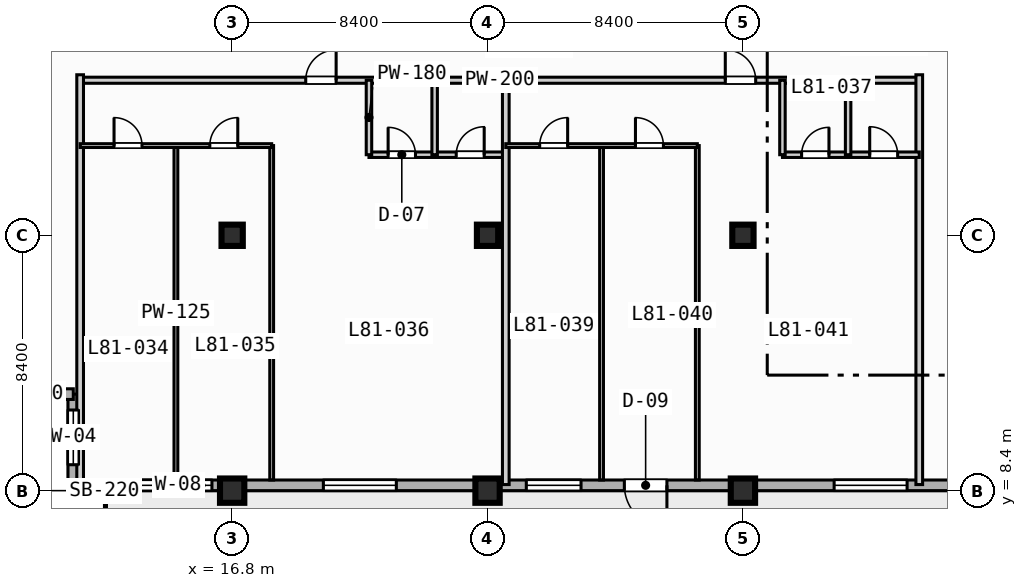
"""IFC4 building model, lengths in metres.
Left out: names, types, materials, properties, quantities, classifications, styles, units other than length and angle.
Written with IfcOpenShell. Run it as: python <this file> out.ifc"""

import sys

from ifc_helpers import new_model, si_unit, direction, frame, frame_2d, origin, origin_2d, place, context, subcontext, project, spatial, rectangle, extrude, element, fill, save


model = new_model("IFC4")
c1 = context("Model", 3, precision=1e-05, world=origin(), true_north=direction((0.0, 1.0)))
c2 = subcontext(c1, "Body", "Model", "MODEL_VIEW")
j1 = project(units=[si_unit("LENGTHUNIT", "METRE"), si_unit("PLANEANGLEUNIT", "RADIAN")], contexts=[c1])
p1 = place(None, origin())
s1 = spatial("IfcSite", under=j1, at=p1, CompositionType="ELEMENT")
p2 = place(p1, origin())
s2 = spatial("IfcBuilding", under=s1, at=p2, CompositionType="ELEMENT")
p3 = place(p2, frame((0.0, 0.0, 328.1)))
s3 = spatial("IfcBuildingStorey", under=s2, at=p3, CompositionType="ELEMENT", Elevation=328.1)
p4 = place(p3, frame((16.8, 8.4, 0.0), z_axis=(0.0, 0.0, 1.0), x_axis=(1.0, 0.0, 0.0)))
e1 = element("IfcColumn", 1, at=p4, inside=s3, PredefinedType="COLUMN", context=c2, shape_type="SweptSolid", body=[
    extrude(rectangle(XDim=0.8, YDim=0.8, at=origin_2d()), origin(), (0.0, 0.0, 1.0), 3.9),
])
p5 = place(p3, frame((16.8, 16.8, 0.0), z_axis=(0.0, 0.0, 1.0), x_axis=(1.0, 0.0, 0.0)))
e2 = element("IfcColumn", 2, at=p5, inside=s3, PredefinedType="COLUMN", context=c2, shape_type="SweptSolid", body=[
    extrude(rectangle(XDim=0.7, YDim=0.7, at=origin_2d()), origin(), (0.0, 0.0, 1.0), 3.9),
])
p6 = place(p3, frame((25.2, 8.4, 0.0), z_axis=(0.0, 0.0, 1.0), x_axis=(1.0, 0.0, 0.0)))
e3 = element("IfcColumn", 3, at=p6, inside=s3, PredefinedType="COLUMN", context=c2, shape_type="SweptSolid", body=[
    extrude(rectangle(XDim=0.8, YDim=0.8, at=origin_2d()), origin(), (0.0, 0.0, 1.0), 3.9),
])
p7 = place(p3, frame((25.2, 16.8, 0.0), z_axis=(0.0, 0.0, 1.0), x_axis=(1.0, 0.0, 0.0)))
e4 = element("IfcColumn", 4, at=p7, inside=s3, PredefinedType="COLUMN", context=c2, shape_type="SweptSolid", body=[
    extrude(rectangle(XDim=0.7, YDim=0.7, at=origin_2d()), origin(), (0.0, 0.0, 1.0), 3.9),
])
p8 = place(p3, frame((33.6, 8.4, 0.0), z_axis=(0.0, 0.0, 1.0), x_axis=(1.0, 0.0, 0.0)))
e5 = element("IfcColumn", 5, at=p8, inside=s3, PredefinedType="COLUMN", context=c2, shape_type="SweptSolid", body=[
    extrude(rectangle(XDim=0.8, YDim=0.8, at=origin_2d()), origin(), (0.0, 0.0, 1.0), 3.9),
])
p9 = place(p3, frame((33.6, 16.8, 0.0), z_axis=(0.0, 0.0, 1.0), x_axis=(1.0, 0.0, 0.0)))
e6 = element("IfcColumn", 6, at=p9, inside=s3, PredefinedType="COLUMN", context=c2, shape_type="SweptSolid", body=[
    extrude(rectangle(XDim=0.7, YDim=0.7, at=origin_2d()), origin(), (0.0, 0.0, 1.0), 3.9),
])
p10 = place(p3, frame((11.575, 8.575, 0.0), z_axis=(0.0, 0.0, 1.0), x_axis=(0.0, 1.0, 0.0)))
e7 = element("IfcWall", 7, at=p10, inside=s3, PredefinedType="STANDARD", context=c2, shape_type="SweptSolid", body=[
    extrude(rectangle(XDim=3.0, YDim=0.35, at=frame_2d((1.5, 0.0))), origin(), (0.0, 0.0, 1.0), 3.67),
])
p11 = place(p10, frame((0.677, 0.0, 0.85)))
e8 = element("IfcOpeningElement", 8, at=p11, cuts=e7, PredefinedType="OPENING", context=c2, shape_type="SweptSolid", body=[
    extrude(rectangle(XDim=1.8, YDim=1.8, at=frame_2d((0.9, 0.9))), frame((0.0, 0.185, 0.0), z_axis=(0.0, -1.0, 0.0), x_axis=(1.0, 0.0, 0.0)), (0.0, 0.0, 1.0), 0.37),
])
p12 = place(p3, frame((11.575, 11.575, 0.0), z_axis=(0.0, 0.0, 1.0), x_axis=(-1.0, 0.0, 0.0)))
e9 = element("IfcWall", 9, at=p12, inside=s3, PredefinedType="STANDARD", context=c2, shape_type="SweptSolid", body=[
    extrude(rectangle(XDim=3.0, YDim=0.35, at=frame_2d((1.5, 0.0))), origin(), (0.0, 0.0, 1.0), 3.67),
])
p13 = place(p3, frame((64.025, 8.575, 0.0), z_axis=(0.0, 0.0, 1.0), x_axis=(-1.0, 0.0, 0.0)))
e10 = element("IfcWall", 10, at=p13, inside=s3, PredefinedType="STANDARD", context=c2, shape_type="SweptSolid", body=[
    extrude(rectangle(XDim=52.45, YDim=0.35, at=frame_2d((26.225, 0.0))), origin(), (0.0, 0.0, 1.0), 3.67),
])
p14 = place(p13, frame((32.925, 0.0, 0.0)))
e11 = element("IfcOpeningElement", 11, at=p14, cuts=e10, PredefinedType="OPENING", context=c2, shape_type="SweptSolid", body=[
    extrude(rectangle(XDim=1.4, YDim=2.2, at=frame_2d((0.7, 1.1))), frame((0.0, 0.185, 0.0), z_axis=(0.0, -1.0, 0.0), x_axis=(1.0, 0.0, 0.0)), (0.0, 0.0, 1.0), 0.37),
])
p15 = place(p13, frame((41.825, 0.0, 0.85)))
e12 = element("IfcOpeningElement", 12, at=p15, cuts=e10, PredefinedType="OPENING", context=c2, shape_type="SweptSolid", body=[
    extrude(rectangle(XDim=2.4, YDim=1.95, at=frame_2d((1.2, 0.975))), frame((0.0, 0.185, 0.0), z_axis=(0.0, -1.0, 0.0), x_axis=(1.0, 0.0, 0.0)), (0.0, 0.0, 1.0), 0.37),
])
p16 = place(p13, frame((25.025, 0.0, 0.85)))
e13 = element("IfcOpeningElement", 13, at=p16, cuts=e10, PredefinedType="OPENING", context=c2, shape_type="SweptSolid", body=[
    extrude(rectangle(XDim=2.4, YDim=1.95, at=frame_2d((1.2, 0.975))), frame((0.0, 0.185, 0.0), z_axis=(0.0, -1.0, 0.0), x_axis=(1.0, 0.0, 0.0)), (0.0, 0.0, 1.0), 0.37),
])
p17 = place(p13, frame((16.925, 0.0, 0.85)))
e14 = element("IfcOpeningElement", 14, at=p17, cuts=e10, PredefinedType="OPENING", context=c2, shape_type="SweptSolid", body=[
    extrude(rectangle(XDim=1.8, YDim=1.8, at=frame_2d((0.9, 0.9))), frame((0.0, 0.185, 0.0), z_axis=(0.0, -1.0, 0.0), x_axis=(1.0, 0.0, 0.0)), (0.0, 0.0, 1.0), 0.37),
])
p18 = place(p13, frame((49.75, 0.0, 0.85)))
e15 = element("IfcOpeningElement", 15, at=p18, cuts=e10, PredefinedType="OPENING", context=c2, shape_type="SweptSolid", body=[
    extrude(rectangle(XDim=1.8, YDim=1.8, at=frame_2d((0.9, 0.9))), frame((0.0, 0.185, 0.0), z_axis=(0.0, -1.0, 0.0), x_axis=(1.0, 0.0, 0.0)), (0.0, 0.0, 1.0), 0.37),
])
p19 = place(p13, frame((47.89, 0.0, 0.85)))
e16 = element("IfcOpeningElement", 16, at=p19, cuts=e10, PredefinedType="OPENING", context=c2, shape_type="SweptSolid", body=[
    extrude(rectangle(XDim=0.72, YDim=1.8, at=frame_2d((0.36, 0.9))), frame((0.0, 0.185, 0.0), z_axis=(0.0, -1.0, 0.0), x_axis=(1.0, 0.0, 0.0)), (0.0, 0.0, 1.0), 0.37),
])
p20 = place(p13, frame((35.75, 0.0, 0.85)))
e17 = element("IfcOpeningElement", 17, at=p20, cuts=e10, PredefinedType="OPENING", context=c2, shape_type="SweptSolid", body=[
    extrude(rectangle(XDim=1.8, YDim=1.8, at=frame_2d((0.9, 0.9))), frame((0.0, 0.185, 0.0), z_axis=(0.0, -1.0, 0.0), x_axis=(1.0, 0.0, 0.0)), (0.0, 0.0, 1.0), 0.37),
])
p21 = place(p3, frame((11.8, 21.9, 0.0), z_axis=(0.0, 0.0, 1.0), x_axis=(1.0, 0.0, 0.0)))
e18 = element("IfcWall", 18, at=p21, inside=s3, PredefinedType="PARTITIONING", context=c2, shape_type="SweptSolid", body=[
    extrude(rectangle(XDim=27.6, YDim=0.2, at=frame_2d((13.8, 0.0))), origin(), (0.0, 0.0, 1.0), 3.67),
])
p22 = place(p21, frame((7.42, 0.0, 0.0)))
e19 = element("IfcOpeningElement", 19, at=p22, cuts=e18, PredefinedType="OPENING", context=c2, shape_type="SweptSolid", body=[
    extrude(rectangle(XDim=1.0, YDim=2.15, at=frame_2d((0.5, 1.075))), frame((0.0, 0.11, 0.0), z_axis=(0.0, -1.0, 0.0), x_axis=(1.0, 0.0, 0.0)), (0.0, 0.0, 1.0), 0.22),
])
p23 = place(p21, frame((21.22, 0.0, 0.0)))
e20 = element("IfcOpeningElement", 20, at=p23, cuts=e18, PredefinedType="OPENING", context=c2, shape_type="SweptSolid", body=[
    extrude(rectangle(XDim=1.0, YDim=2.15, at=frame_2d((0.5, 1.075))), frame((0.0, 0.11, 0.0), z_axis=(0.0, -1.0, 0.0), x_axis=(1.0, 0.0, 0.0)), (0.0, 0.0, 1.0), 0.22),
])
p24 = place(p3, frame((11.8, 8.6, 0.0), z_axis=(0.0, 0.0, 1.0), x_axis=(0.0, 1.0, 0.0)))
e21 = element("IfcWall", 21, at=p24, inside=s3, PredefinedType="PARTITIONING", context=c2, shape_type="SweptSolid", body=[
    extrude(rectangle(XDim=13.48, YDim=0.22, at=frame_2d((6.74, 0.0))), origin(), (0.0, 0.0, 1.0), 3.67),
])
p25 = place(p3, frame((21.3, 19.45, 0.0), z_axis=(0.0, 0.0, 1.0), x_axis=(1.0, 0.0, 0.0)))
e22 = element("IfcWall", 22, at=p25, inside=s3, PredefinedType="PLUMBINGWALL", context=c2, shape_type="SweptSolid", body=[
    extrude(rectangle(XDim=4.5, YDim=0.18, at=frame_2d((2.25, 0.0))), origin(), (0.0, 0.0, 1.0), 3.67),
])
p26 = place(p25, frame((0.63, 0.0, 0.0)))
e23 = element("IfcOpeningElement", 23, at=p26, cuts=e22, PredefinedType="OPENING", context=c2, shape_type="SweptSolid", body=[
    extrude(rectangle(XDim=0.9, YDim=2.1, at=frame_2d((0.45, 1.05))), frame((0.0, 0.1, 0.0), z_axis=(0.0, -1.0, 0.0), x_axis=(1.0, 0.0, 0.0)), (0.0, 0.0, 1.0), 0.2),
])
p27 = place(p25, frame((2.87, 0.0, 0.0)))
e24 = element("IfcOpeningElement", 24, at=p27, cuts=e22, PredefinedType="OPENING", context=c2, shape_type="SweptSolid", body=[
    extrude(rectangle(XDim=0.92, YDim=2.1, at=frame_2d((0.46, 1.05))), frame((0.0, 0.1, 0.0), z_axis=(0.0, -1.0, 0.0), x_axis=(1.0, 0.0, 0.0)), (0.0, 0.0, 1.0), 0.2),
])
for number, where, z_axis, x_axis in (
    (25, (21.3, 19.45, 0.0), (0.0, 0.0, 1.0), (0.0, 1.0, 0.0)),
    (26, (23.46, 19.45, 0.0), (0.0, 0.0, 1.0), (0.0, 1.0, 0.0)),
):
    element("IfcWall", number, at=place(p3, frame(where, z_axis=z_axis, x_axis=x_axis)), inside=s3, PredefinedType="PLUMBINGWALL", context=c2, shape_type="SweptSolid", body=[
        extrude(rectangle(XDim=2.45, YDim=0.18, at=frame_2d((1.225, 0.0))), origin(), (0.0, 0.0, 1.0), 3.67),
    ])
for number, where, z_axis, x_axis in (
    (27, (14.95, 8.75, 0.0), (0.0, 0.0, 1.0), (0.0, 1.0, 0.0)),
    (28, (18.1, 8.75, 0.0), (0.0, 0.0, 1.0), (0.0, 1.0, 0.0)),
):
    element("IfcWall", number, at=place(p3, frame(where, z_axis=z_axis, x_axis=x_axis)), inside=s3, PredefinedType="PARTITIONING", context=c2, shape_type="SweptSolid", body=[
        extrude(rectangle(XDim=11.0, YDim=0.125, at=frame_2d((5.5, 0.0))), origin(), (0.0, 0.0, 1.0), 3.67),
    ])
p28 = place(p3, frame((11.8, 19.75, 0.0), z_axis=(0.0, 0.0, 1.0), x_axis=(1.0, 0.0, 0.0)))
e29 = element("IfcWall", 29, at=p28, inside=s3, PredefinedType="PARTITIONING", context=c2, shape_type="SweptSolid", body=[
    extrude(rectangle(XDim=6.3, YDim=0.125, at=frame_2d((3.15, 0.0))), origin(), (0.0, 0.0, 1.0), 3.67),
])
p29 = place(p28, frame((1.115, 0.0, 0.0)))
e30 = element("IfcOpeningElement", 30, at=p29, cuts=e29, PredefinedType="OPENING", context=c2, shape_type="SweptSolid", body=[
    extrude(rectangle(XDim=0.92, YDim=2.1, at=frame_2d((0.46, 1.05))), frame((0.0, 0.073, 0.0), z_axis=(0.0, -1.0, 0.0), x_axis=(1.0, 0.0, 0.0)), (0.0, 0.0, 1.0), 0.145),
])
p30 = place(p28, frame((4.265, 0.0, 0.0)))
e31 = element("IfcOpeningElement", 31, at=p30, cuts=e29, PredefinedType="OPENING", context=c2, shape_type="SweptSolid", body=[
    extrude(rectangle(XDim=0.92, YDim=2.1, at=frame_2d((0.46, 1.05))), frame((0.0, 0.073, 0.0), z_axis=(0.0, -1.0, 0.0), x_axis=(1.0, 0.0, 0.0)), (0.0, 0.0, 1.0), 0.145),
])
for number, where, z_axis, x_axis in (
    (32, (25.8, 8.6, 0.0), (0.0, 0.0, 1.0), (0.0, 1.0, 0.0)),
    (33, (39.4, 8.6, 0.0), (0.0, 0.0, 1.0), (0.0, 1.0, 0.0)),
):
    element("IfcWall", number, at=place(p3, frame(where, z_axis=z_axis, x_axis=x_axis)), inside=s3, PredefinedType="PARTITIONING", context=c2, shape_type="SweptSolid", body=[
        extrude(rectangle(XDim=13.48, YDim=0.22, at=frame_2d((6.74, 0.0))), origin(), (0.0, 0.0, 1.0), 3.67),
    ])
p31 = place(p3, frame((34.9, 19.45, 0.0), z_axis=(0.0, 0.0, 1.0), x_axis=(1.0, 0.0, 0.0)))
e34 = element("IfcWall", 34, at=p31, inside=s3, PredefinedType="PLUMBINGWALL", context=c2, shape_type="SweptSolid", body=[
    extrude(rectangle(XDim=4.5, YDim=0.18, at=frame_2d((2.25, 0.0))), origin(), (0.0, 0.0, 1.0), 3.67),
])
p32 = place(p31, frame((0.63, 0.0, 0.0)))
e35 = element("IfcOpeningElement", 35, at=p32, cuts=e34, PredefinedType="OPENING", context=c2, shape_type="SweptSolid", body=[
    extrude(rectangle(XDim=0.9, YDim=2.1, at=frame_2d((0.45, 1.05))), frame((0.0, 0.1, 0.0), z_axis=(0.0, -1.0, 0.0), x_axis=(1.0, 0.0, 0.0)), (0.0, 0.0, 1.0), 0.2),
])
p33 = place(p31, frame((2.87, 0.0, 0.0)))
e36 = element("IfcOpeningElement", 36, at=p33, cuts=e34, PredefinedType="OPENING", context=c2, shape_type="SweptSolid", body=[
    extrude(rectangle(XDim=0.92, YDim=2.1, at=frame_2d((0.46, 1.05))), frame((0.0, 0.1, 0.0), z_axis=(0.0, -1.0, 0.0), x_axis=(1.0, 0.0, 0.0)), (0.0, 0.0, 1.0), 0.2),
])
for number, where, z_axis, x_axis in (
    (37, (34.9, 19.45, 0.0), (0.0, 0.0, 1.0), (0.0, 1.0, 0.0)),
    (38, (37.06, 19.45, 0.0), (0.0, 0.0, 1.0), (0.0, 1.0, 0.0)),
):
    element("IfcWall", number, at=place(p3, frame(where, z_axis=z_axis, x_axis=x_axis)), inside=s3, PredefinedType="PLUMBINGWALL", context=c2, shape_type="SweptSolid", body=[
        extrude(rectangle(XDim=2.45, YDim=0.18, at=frame_2d((1.225, 0.0))), origin(), (0.0, 0.0, 1.0), 3.67),
    ])
for number, where, z_axis, x_axis in (
    (39, (28.95, 8.75, 0.0), (0.0, 0.0, 1.0), (0.0, 1.0, 0.0)),
    (40, (32.1, 8.75, 0.0), (0.0, 0.0, 1.0), (0.0, 1.0, 0.0)),
):
    element("IfcWall", number, at=place(p3, frame(where, z_axis=z_axis, x_axis=x_axis)), inside=s3, PredefinedType="PARTITIONING", context=c2, shape_type="SweptSolid", body=[
        extrude(rectangle(XDim=11.0, YDim=0.125, at=frame_2d((5.5, 0.0))), origin(), (0.0, 0.0, 1.0), 3.67),
    ])
p34 = place(p3, frame((25.8, 19.75, 0.0), z_axis=(0.0, 0.0, 1.0), x_axis=(1.0, 0.0, 0.0)))
e41 = element("IfcWall", 41, at=p34, inside=s3, PredefinedType="PARTITIONING", context=c2, shape_type="SweptSolid", body=[
    extrude(rectangle(XDim=6.3, YDim=0.125, at=frame_2d((3.15, 0.0))), origin(), (0.0, 0.0, 1.0), 3.67),
])
p35 = place(p34, frame((1.115, 0.0, 0.0)))
e42 = element("IfcOpeningElement", 42, at=p35, cuts=e41, PredefinedType="OPENING", context=c2, shape_type="SweptSolid", body=[
    extrude(rectangle(XDim=0.92, YDim=2.1, at=frame_2d((0.46, 1.05))), frame((0.0, 0.073, 0.0), z_axis=(0.0, -1.0, 0.0), x_axis=(1.0, 0.0, 0.0)), (0.0, 0.0, 1.0), 0.145),
])
p36 = place(p34, frame((4.265, 0.0, 0.0)))
e43 = element("IfcOpeningElement", 43, at=p36, cuts=e41, PredefinedType="OPENING", context=c2, shape_type="SweptSolid", body=[
    extrude(rectangle(XDim=0.92, YDim=2.1, at=frame_2d((0.46, 1.05))), frame((0.0, 0.073, 0.0), z_axis=(0.0, -1.0, 0.0), x_axis=(1.0, 0.0, 0.0)), (0.0, 0.0, 1.0), 0.145),
])
p37 = place(p11, origin())
e44 = element("IfcWindow", 44, at=p37, inside=s3, PartitioningType="SINGLE_PANEL", PredefinedType="WINDOW", context=c2, shape_type="SweptSolid", body=[
    extrude(rectangle(XDim=1.8, YDim=1.8, at=frame_2d((0.9, 0.9))), frame((0.0, 0.03, 0.0), z_axis=(0.0, -1.0, 0.0), x_axis=(1.0, 0.0, 0.0)), (0.0, 0.0, 1.0), 0.06),
])
fill(e8, e44)
p38 = place(p14, origin())
e45 = element("IfcDoor", 45, at=p38, inside=s3, OperationType="SINGLE_SWING_LEFT", PredefinedType="DOOR", context=c2, shape_type="SweptSolid", body=[
    extrude(rectangle(XDim=1.4, YDim=2.2, at=frame_2d((0.7, 1.1))), frame((0.0, 0.025, 0.0), z_axis=(0.0, -1.0, 0.0), x_axis=(1.0, 0.0, 0.0)), (0.0, 0.0, 1.0), 0.05),
])
fill(e11, e45)
p39 = place(p15, origin())
e46 = element("IfcWindow", 46, at=p39, inside=s3, PartitioningType="SINGLE_PANEL", PredefinedType="WINDOW", context=c2, shape_type="SweptSolid", body=[
    extrude(rectangle(XDim=2.4, YDim=1.95, at=frame_2d((1.2, 0.975))), frame((0.0, 0.03, 0.0), z_axis=(0.0, -1.0, 0.0), x_axis=(1.0, 0.0, 0.0)), (0.0, 0.0, 1.0), 0.06),
])
fill(e12, e46)
p40 = place(p16, origin())
e47 = element("IfcWindow", 47, at=p40, inside=s3, PartitioningType="SINGLE_PANEL", PredefinedType="WINDOW", context=c2, shape_type="SweptSolid", body=[
    extrude(rectangle(XDim=2.4, YDim=1.95, at=frame_2d((1.2, 0.975))), frame((0.0, 0.03, 0.0), z_axis=(0.0, -1.0, 0.0), x_axis=(1.0, 0.0, 0.0)), (0.0, 0.0, 1.0), 0.06),
])
fill(e13, e47)
p41 = place(p18, origin())
e48 = element("IfcWindow", 48, at=p41, inside=s3, PartitioningType="SINGLE_PANEL", PredefinedType="WINDOW", context=c2, shape_type="SweptSolid", body=[
    extrude(rectangle(XDim=1.8, YDim=1.8, at=frame_2d((0.9, 0.9))), frame((0.0, 0.03, 0.0), z_axis=(0.0, -1.0, 0.0), x_axis=(1.0, 0.0, 0.0)), (0.0, 0.0, 1.0), 0.06),
])
fill(e15, e48)
p42 = place(p19, origin())
e49 = element("IfcWindow", 49, at=p42, inside=s3, PartitioningType="SINGLE_PANEL", PredefinedType="WINDOW", context=c2, shape_type="SweptSolid", body=[
    extrude(rectangle(XDim=0.72, YDim=1.8, at=frame_2d((0.36, 0.9))), frame((0.0, 0.03, 0.0), z_axis=(0.0, -1.0, 0.0), x_axis=(1.0, 0.0, 0.0)), (0.0, 0.0, 1.0), 0.06),
])
fill(e16, e49)
p43 = place(p20, origin())
e50 = element("IfcWindow", 50, at=p43, inside=s3, PartitioningType="SINGLE_PANEL", PredefinedType="WINDOW", context=c2, shape_type="SweptSolid", body=[
    extrude(rectangle(XDim=1.8, YDim=1.8, at=frame_2d((0.9, 0.9))), frame((0.0, 0.03, 0.0), z_axis=(0.0, -1.0, 0.0), x_axis=(1.0, 0.0, 0.0)), (0.0, 0.0, 1.0), 0.06),
])
fill(e17, e50)
p44 = place(p22, origin())
e51 = element("IfcDoor", 51, at=p44, inside=s3, OperationType="SINGLE_SWING_RIGHT", PredefinedType="DOOR", context=c2, shape_type="SweptSolid", body=[
    extrude(rectangle(XDim=1.0, YDim=2.15, at=frame_2d((0.5, 1.075))), frame((0.0, 0.025, 0.0), z_axis=(0.0, -1.0, 0.0), x_axis=(1.0, 0.0, 0.0)), (0.0, 0.0, 1.0), 0.05),
])
fill(e19, e51)
p45 = place(p23, origin())
e52 = element("IfcDoor", 52, at=p45, inside=s3, OperationType="SINGLE_SWING_LEFT", PredefinedType="DOOR", context=c2, shape_type="SweptSolid", body=[
    extrude(rectangle(XDim=1.0, YDim=2.15, at=frame_2d((0.5, 1.075))), frame((0.0, 0.025, 0.0), z_axis=(0.0, -1.0, 0.0), x_axis=(1.0, 0.0, 0.0)), (0.0, 0.0, 1.0), 0.05),
])
fill(e20, e52)
p46 = place(p26, origin())
e53 = element("IfcDoor", 53, at=p46, inside=s3, OperationType="SINGLE_SWING_LEFT", PredefinedType="DOOR", context=c2, shape_type="SweptSolid", body=[
    extrude(rectangle(XDim=0.9, YDim=2.1, at=frame_2d((0.45, 1.05))), frame((0.0, 0.025, 0.0), z_axis=(0.0, -1.0, 0.0), x_axis=(1.0, 0.0, 0.0)), (0.0, 0.0, 1.0), 0.05),
])
fill(e23, e53)
p47 = place(p27, origin())
e54 = element("IfcDoor", 54, at=p47, inside=s3, OperationType="SINGLE_SWING_RIGHT", PredefinedType="DOOR", context=c2, shape_type="SweptSolid", body=[
    extrude(rectangle(XDim=0.92, YDim=2.1, at=frame_2d((0.46, 1.05))), frame((0.0, 0.025, 0.0), z_axis=(0.0, -1.0, 0.0), x_axis=(1.0, 0.0, 0.0)), (0.0, 0.0, 1.0), 0.05),
])
fill(e24, e54)
p48 = place(p29, origin())
e55 = element("IfcDoor", 55, at=p48, inside=s3, OperationType="SINGLE_SWING_LEFT", PredefinedType="DOOR", context=c2, shape_type="SweptSolid", body=[
    extrude(rectangle(XDim=0.92, YDim=2.1, at=frame_2d((0.46, 1.05))), frame((0.0, 0.025, 0.0), z_axis=(0.0, -1.0, 0.0), x_axis=(1.0, 0.0, 0.0)), (0.0, 0.0, 1.0), 0.05),
])
fill(e30, e55)
p49 = place(p30, origin())
e56 = element("IfcDoor", 56, at=p49, inside=s3, OperationType="SINGLE_SWING_RIGHT", PredefinedType="DOOR", context=c2, shape_type="SweptSolid", body=[
    extrude(rectangle(XDim=0.92, YDim=2.1, at=frame_2d((0.46, 1.05))), frame((0.0, 0.025, 0.0), z_axis=(0.0, -1.0, 0.0), x_axis=(1.0, 0.0, 0.0)), (0.0, 0.0, 1.0), 0.05),
])
fill(e31, e56)
p50 = place(p32, origin())
e57 = element("IfcDoor", 57, at=p50, inside=s3, OperationType="SINGLE_SWING_RIGHT", PredefinedType="DOOR", context=c2, shape_type="SweptSolid", body=[
    extrude(rectangle(XDim=0.9, YDim=2.1, at=frame_2d((0.45, 1.05))), frame((0.0, 0.025, 0.0), z_axis=(0.0, -1.0, 0.0), x_axis=(1.0, 0.0, 0.0)), (0.0, 0.0, 1.0), 0.05),
])
fill(e35, e57)
p51 = place(p33, origin())
e58 = element("IfcDoor", 58, at=p51, inside=s3, OperationType="SINGLE_SWING_LEFT", PredefinedType="DOOR", context=c2, shape_type="SweptSolid", body=[
    extrude(rectangle(XDim=0.92, YDim=2.1, at=frame_2d((0.46, 1.05))), frame((0.0, 0.025, 0.0), z_axis=(0.0, -1.0, 0.0), x_axis=(1.0, 0.0, 0.0)), (0.0, 0.0, 1.0), 0.05),
])
fill(e36, e58)
p52 = place(p35, origin())
e59 = element("IfcDoor", 59, at=p52, inside=s3, OperationType="SINGLE_SWING_RIGHT", PredefinedType="DOOR", context=c2, shape_type="SweptSolid", body=[
    extrude(rectangle(XDim=0.92, YDim=2.1, at=frame_2d((0.46, 1.05))), frame((0.0, 0.025, 0.0), z_axis=(0.0, -1.0, 0.0), x_axis=(1.0, 0.0, 0.0)), (0.0, 0.0, 1.0), 0.05),
])
fill(e42, e59)
p53 = place(p36, origin())
e60 = element("IfcDoor", 60, at=p53, inside=s3, OperationType="SINGLE_SWING_LEFT", PredefinedType="DOOR", context=c2, shape_type="SweptSolid", body=[
    extrude(rectangle(XDim=0.92, YDim=2.1, at=frame_2d((0.46, 1.05))), frame((0.0, 0.025, 0.0), z_axis=(0.0, -1.0, 0.0), x_axis=(1.0, 0.0, 0.0)), (0.0, 0.0, 1.0), 0.05),
])
fill(e43, e60)
save(model, sys.argv[1])
